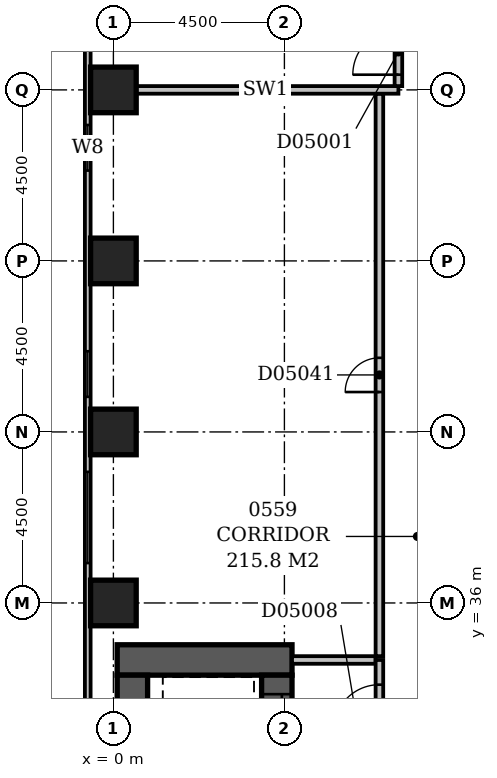
"""IFC4 building model, lengths in metres.
Left out: names, types, materials, properties, quantities, classifications, styles, units other than length and angle.
Written with IfcOpenShell. Run it as: python <this file> out.ifc"""

import sys

from ifc_helpers import new_model, si_unit, direction, frame, frame_2d, origin, origin_2d, place, context, subcontext, project, spatial, rectangle, extrude, element, fill, save


model = new_model("IFC4")
c1 = context("Model", 3, precision=1e-05, world=origin(), true_north=direction((0.0, 1.0)))
c2 = subcontext(c1, "Body", "Model", "MODEL_VIEW")
j1 = project(units=[si_unit("LENGTHUNIT", "METRE"), si_unit("PLANEANGLEUNIT", "RADIAN")], contexts=[c1])
p1 = place(None, origin())
s1 = spatial("IfcSite", under=j1, at=p1, CompositionType="ELEMENT")
p2 = place(p1, origin())
s2 = spatial("IfcBuilding", under=s1, at=p2, CompositionType="ELEMENT")
p3 = place(p2, frame((0.0, 0.0, 29.0)))
s3 = spatial("IfcBuildingStorey", under=s2, at=p3, CompositionType="ELEMENT", Elevation=29.0)
p4 = place(p3, frame((0.1, 34.5, -0.3), z_axis=(0.0, 0.0, 1.0), x_axis=(1.0, 0.0, 0.0)))
e1 = element("IfcWall", 1, at=p4, inside=s3, PredefinedType="SHEAR", context=c2, shape_type="SweptSolid", body=[
    extrude(rectangle(XDim=4.6, YDim=0.8, at=frame_2d((2.3, 0.0))), origin(), (0.0, 0.0, 1.0), 3.6),
])
p5 = place(p3, frame((0.5, 27.15, -0.3), z_axis=(0.0, 0.0, 1.0), x_axis=(0.0, 1.0, 0.0)))
e2 = element("IfcWall", 2, at=p5, inside=s3, PredefinedType="SHEAR", context=c2, shape_type="SweptSolid", body=[
    extrude(rectangle(XDim=6.95, YDim=0.8, at=frame_2d((3.475, 0.0))), origin(), (0.0, 0.0, 1.0), 3.6),
])
p6 = place(p3, frame((4.3, 27.15, -0.3), z_axis=(0.0, 0.0, 1.0), x_axis=(0.0, 1.0, 0.0)))
e3 = element("IfcWall", 3, at=p6, inside=s3, PredefinedType="SHEAR", context=c2, shape_type="SweptSolid", body=[
    extrude(rectangle(XDim=6.95, YDim=0.8, at=frame_2d((3.475, 0.0))), origin(), (0.0, 0.0, 1.0), 3.6),
])
p7 = place(p6, frame((3.05, 0.0, 0.3)))
e4 = element("IfcOpeningElement", 4, at=p7, cuts=e3, PredefinedType="OPENING", context=c2, shape_type="SweptSolid", body=[
    extrude(rectangle(XDim=1.1, YDim=2.1, at=frame_2d((0.55, 1.05))), frame((0.0, 0.412, 0.0), z_axis=(0.0, -1.0, 0.0), x_axis=(1.0, 0.0, 0.0)), (0.0, 0.0, 1.0), 0.824),
])
p8 = place(p6, frame((0.55, 0.0, 0.3)))
e5 = element("IfcOpeningElement", 5, at=p8, cuts=e3, PredefinedType="OPENING", context=c2, shape_type="SweptSolid", body=[
    extrude(rectangle(XDim=1.1, YDim=2.1, at=frame_2d((0.55, 1.05))), frame((0.0, 0.412, 0.0), z_axis=(0.0, -1.0, 0.0), x_axis=(1.0, 0.0, 0.0)), (0.0, 0.0, 1.0), 0.824),
])
p9 = place(p6, frame((5.35, 0.0, 0.3)))
e6 = element("IfcOpeningElement", 6, at=p9, cuts=e3, PredefinedType="OPENING", context=c2, shape_type="SweptSolid", body=[
    extrude(rectangle(XDim=1.1, YDim=2.1, at=frame_2d((0.55, 1.05))), frame((0.0, 0.412, 0.0), z_axis=(0.0, -1.0, 0.0), x_axis=(1.0, 0.0, 0.0)), (0.0, 0.0, 1.0), 0.824),
])
for number, where, z_axis, x_axis in (
    (7, (0.0, 36.0, -0.3), (0.0, 0.0, 1.0), (1.0, 0.0, 0.0)),
    (8, (0.0, 40.5, -0.3), (0.0, 0.0, 1.0), (1.0, 0.0, 0.0)),
    (9, (0.0, 45.0, -0.3), (0.0, 0.0, 1.0), (1.0, 0.0, 0.0)),
    (10, (0.0, 49.5, -0.3), (0.0, 0.0, 1.0), (1.0, 0.0, 0.0)),
):
    element("IfcColumn", number, at=place(p3, frame(where, z_axis=z_axis, x_axis=x_axis)), inside=s3, PredefinedType="COLUMN", context=c2, shape_type="SweptSolid", body=[
        extrude(rectangle(XDim=1.2, YDim=1.2, at=origin_2d()), origin(), (0.0, 0.0, 1.0), 3.6),
    ])
p10 = place(p3, frame((-0.675, 59.1, 0.0), z_axis=(0.0, 0.0, 1.0), x_axis=(0.0, -1.0, 0.0)))
e11 = element("IfcWall", 11, at=p10, inside=s3, PredefinedType="STANDARD", context=c2, shape_type="SweptSolid", body=[
    extrude(rectangle(XDim=55.35, YDim=0.15, at=frame_2d((27.675, 0.0))), origin(), (0.0, 0.0, 1.0), 2.7),
])
p11 = place(p10, frame((10.523, 0.0, 0.6)))
e12 = element("IfcOpeningElement", 12, at=p11, cuts=e11, PredefinedType="OPENING", context=c2, shape_type="SweptSolid", body=[
    extrude(rectangle(XDim=1.2, YDim=1.8, at=frame_2d((0.6, 0.9))), frame((0.0, 0.087, 0.0), z_axis=(0.0, -1.0, 0.0), x_axis=(1.0, 0.0, 0.0)), (0.0, 0.0, 1.0), 0.174),
])
p12 = place(p10, frame((16.477, 0.0, 0.6)))
e13 = element("IfcOpeningElement", 13, at=p12, cuts=e11, PredefinedType="OPENING", context=c2, shape_type="SweptSolid", body=[
    extrude(rectangle(XDim=1.2, YDim=1.8, at=frame_2d((0.6, 0.9))), frame((0.0, 0.087, 0.0), z_axis=(0.0, -1.0, 0.0), x_axis=(1.0, 0.0, 0.0)), (0.0, 0.0, 1.0), 0.174),
])
p13 = place(p10, frame((19.65, 0.0, 0.6)))
e14 = element("IfcOpeningElement", 14, at=p13, cuts=e11, PredefinedType="OPENING", context=c2, shape_type="SweptSolid", body=[
    extrude(rectangle(XDim=2.4, YDim=1.8, at=frame_2d((1.2, 0.9))), frame((0.0, 0.087, 0.0), z_axis=(0.0, -1.0, 0.0), x_axis=(1.0, 0.0, 0.0)), (0.0, 0.0, 1.0), 0.174),
])
p14 = place(p10, frame((43.477, 0.0, 0.6)))
e15 = element("IfcOpeningElement", 15, at=p14, cuts=e11, PredefinedType="OPENING", context=c2, shape_type="SweptSolid", body=[
    extrude(rectangle(XDim=1.2, YDim=1.8, at=frame_2d((0.6, 0.9))), frame((0.0, 0.087, 0.0), z_axis=(0.0, -1.0, 0.0), x_axis=(1.0, 0.0, 0.0)), (0.0, 0.0, 1.0), 0.174),
])
p15 = place(p3, frame((7.0, 32.1, 0.0), z_axis=(0.0, 0.0, 1.0), x_axis=(0.0, 1.0, 0.0)))
e16 = element("IfcWall", 16, at=p15, inside=s3, PredefinedType="PARTITIONING", context=c2, shape_type="SweptSolid", body=[
    extrude(rectangle(XDim=2.4, YDim=0.2, at=frame_2d((1.2, 0.0))), origin(), (0.0, 0.0, 1.0), 3.3),
])
p16 = place(p15, frame((0.55, 0.0, 0.0)))
e17 = element("IfcOpeningElement", 17, at=p16, cuts=e16, PredefinedType="OPENING", context=c2, shape_type="SweptSolid", body=[
    extrude(rectangle(XDim=1.2, YDim=2.1, at=frame_2d((0.6, 1.05))), frame((0.0, 0.112, 0.0), z_axis=(0.0, -1.0, 0.0), x_axis=(1.0, 0.0, 0.0)), (0.0, 0.0, 1.0), 0.224),
])
p17 = place(p3, frame((4.7, 34.5, 0.0), z_axis=(0.0, 0.0, 1.0), x_axis=(1.0, 0.0, 0.0)))
e18 = element("IfcWall", 18, at=p17, inside=s3, PredefinedType="PARTITIONING", context=c2, shape_type="SweptSolid", body=[
    extrude(rectangle(XDim=2.2, YDim=0.2, at=frame_2d((1.1, 0.0))), origin(), (0.0, 0.0, 1.0), 3.3),
])
p18 = place(p3, frame((0.5, 49.5, 0.0), z_axis=(0.0, 0.0, 1.0), x_axis=(1.0, 0.0, 0.0)))
e19 = element("IfcWall", 19, at=p18, inside=s3, PredefinedType="PARTITIONING", context=c2, shape_type="SweptSolid", body=[
    extrude(rectangle(XDim=7.0, YDim=0.2, at=frame_2d((3.5, 0.0))), origin(), (0.0, 0.0, 1.0), 3.3),
])
p19 = place(p3, frame((7.5, 49.6, 0.0), z_axis=(0.0, 0.0, 1.0), x_axis=(0.0, 1.0, 0.0)))
e20 = element("IfcWall", 20, at=p19, inside=s3, PredefinedType="PARTITIONING", context=c2, shape_type="SweptSolid", body=[
    extrude(rectangle(XDim=3.9, YDim=0.2, at=frame_2d((1.95, 0.0))), origin(), (0.0, 0.0, 1.0), 3.3),
])
p20 = place(p19, frame((0.3, 0.0, 0.0)))
e21 = element("IfcOpeningElement", 21, at=p20, cuts=e20, PredefinedType="OPENING", context=c2, shape_type="SweptSolid", body=[
    extrude(rectangle(XDim=1.2, YDim=2.1, at=frame_2d((0.6, 1.05))), frame((0.0, 0.112, 0.0), z_axis=(0.0, -1.0, 0.0), x_axis=(1.0, 0.0, 0.0)), (0.0, 0.0, 1.0), 0.224),
])
p21 = place(p3, frame((7.0, 34.6, 0.0), z_axis=(0.0, 0.0, 1.0), x_axis=(0.0, 1.0, 0.0)))
e22 = element("IfcWall", 22, at=p21, inside=s3, PredefinedType="PARTITIONING", context=c2, shape_type="SweptSolid", body=[
    extrude(rectangle(XDim=14.8, YDim=0.2, at=frame_2d((7.4, 0.0))), origin(), (0.0, 0.0, 1.0), 3.3),
])
p22 = place(p21, frame((6.95, 0.0, 0.0)))
e23 = element("IfcOpeningElement", 23, at=p22, cuts=e22, PredefinedType="OPENING", context=c2, shape_type="SweptSolid", body=[
    extrude(rectangle(XDim=0.9, YDim=2.1, at=frame_2d((0.45, 1.05))), frame((0.0, 0.112, 0.0), z_axis=(0.0, -1.0, 0.0), x_axis=(1.0, 0.0, 0.0)), (0.0, 0.0, 1.0), 0.224),
])
p23 = place(p11, origin())
e24 = element("IfcWindow", 24, at=p23, inside=s3, PartitioningType="SINGLE_PANEL", PredefinedType="WINDOW", context=c2, shape_type="SweptSolid", body=[
    extrude(rectangle(XDim=1.2, YDim=1.8, at=frame_2d((0.6, 0.9))), frame((0.0, 0.03, 0.0), z_axis=(0.0, -1.0, 0.0), x_axis=(1.0, 0.0, 0.0)), (0.0, 0.0, 1.0), 0.06),
])
fill(e12, e24)
p24 = place(p12, origin())
e25 = element("IfcWindow", 25, at=p24, inside=s3, PartitioningType="SINGLE_PANEL", PredefinedType="WINDOW", context=c2, shape_type="SweptSolid", body=[
    extrude(rectangle(XDim=1.2, YDim=1.8, at=frame_2d((0.6, 0.9))), frame((0.0, 0.03, 0.0), z_axis=(0.0, -1.0, 0.0), x_axis=(1.0, 0.0, 0.0)), (0.0, 0.0, 1.0), 0.06),
])
fill(e13, e25)
p25 = place(p13, origin())
e26 = element("IfcWindow", 26, at=p25, inside=s3, PartitioningType="SINGLE_PANEL", PredefinedType="WINDOW", context=c2, shape_type="SweptSolid", body=[
    extrude(rectangle(XDim=2.4, YDim=1.8, at=frame_2d((1.2, 0.9))), frame((0.0, 0.03, 0.0), z_axis=(0.0, -1.0, 0.0), x_axis=(1.0, 0.0, 0.0)), (0.0, 0.0, 1.0), 0.06),
])
fill(e14, e26)
p26 = place(p20, origin())
e27 = element("IfcDoor", 27, at=p26, inside=s3, OperationType="SINGLE_SWING_LEFT", PredefinedType="DOOR", context=c2, shape_type="SweptSolid", body=[
    extrude(rectangle(XDim=1.2, YDim=2.1, at=frame_2d((0.6, 1.05))), frame((0.0, 0.025, 0.0), z_axis=(0.0, -1.0, 0.0), x_axis=(1.0, 0.0, 0.0)), (0.0, 0.0, 1.0), 0.05),
])
fill(e21, e27)
p27 = place(p16, origin())
e28 = element("IfcDoor", 28, at=p27, inside=s3, OperationType="SINGLE_SWING_LEFT", PredefinedType="DOOR", context=c2, shape_type="SweptSolid", body=[
    extrude(rectangle(XDim=1.2, YDim=2.1, at=frame_2d((0.6, 1.05))), frame((0.0, 0.025, 0.0), z_axis=(0.0, -1.0, 0.0), x_axis=(1.0, 0.0, 0.0)), (0.0, 0.0, 1.0), 0.05),
])
fill(e17, e28)
p28 = place(p9, origin())
e29 = element("IfcDoor", 29, at=p28, inside=s3, OperationType="SLIDING_TO_LEFT", PredefinedType="DOOR", context=c2, shape_type="SweptSolid", body=[
    extrude(rectangle(XDim=1.1, YDim=2.1, at=frame_2d((0.55, 1.05))), frame((0.0, 0.025, 0.0), z_axis=(0.0, -1.0, 0.0), x_axis=(1.0, 0.0, 0.0)), (0.0, 0.0, 1.0), 0.05),
])
fill(e6, e29)
p29 = place(p22, origin())
e30 = element("IfcDoor", 30, at=p29, inside=s3, OperationType="SINGLE_SWING_LEFT", PredefinedType="DOOR", context=c2, shape_type="SweptSolid", body=[
    extrude(rectangle(XDim=0.9, YDim=2.1, at=frame_2d((0.45, 1.05))), frame((0.0, 0.025, 0.0), z_axis=(0.0, -1.0, 0.0), x_axis=(1.0, 0.0, 0.0)), (0.0, 0.0, 1.0), 0.05),
])
fill(e23, e30)
save(model, sys.argv[1])
